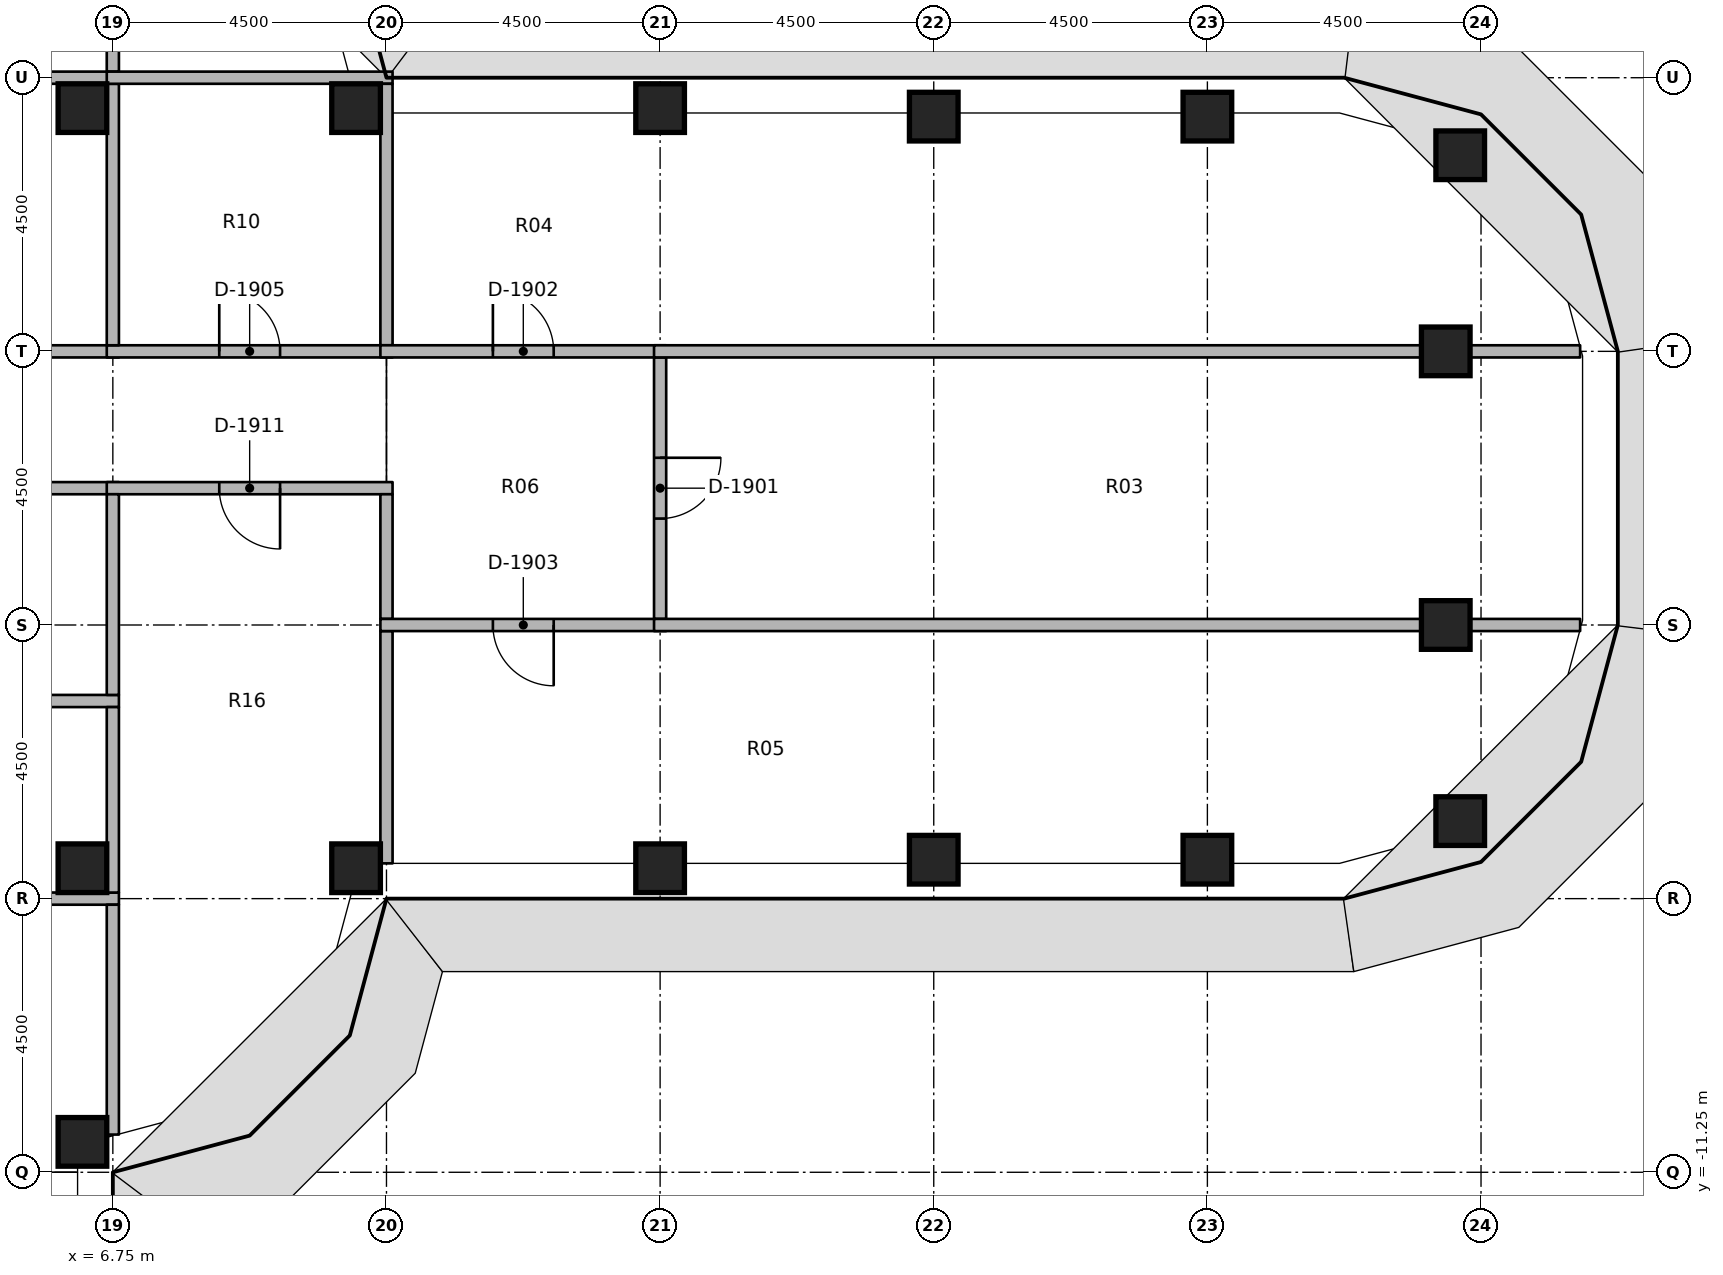
"""IFC4 building model, lengths in metres.
Left out: names, types, materials, properties, quantities, classifications, styles, units other than length and angle.
Written with IfcOpenShell. Run it as: python <this file> out.ifc"""

import sys

from ifc_helpers import new_model, si_unit, direction, frame, frame_2d, origin, origin_2d, place, context, subcontext, project, spatial, rectangle, extrude, element, fill, save


model = new_model("IFC4")
c1 = context("Model", 3, precision=1e-05, world=origin(), true_north=direction((0.0, 1.0)))
c2 = subcontext(c1, "Body", "Model", "MODEL_VIEW")
j1 = project(units=[si_unit("LENGTHUNIT", "METRE"), si_unit("PLANEANGLEUNIT", "RADIAN")], contexts=[c1])
p1 = place(None, origin())
s1 = spatial("IfcSite", under=j1, at=p1, CompositionType="ELEMENT")
p2 = place(p1, origin())
s2 = spatial("IfcBuilding", under=s1, at=p2, CompositionType="ELEMENT")
p3 = place(p2, frame((0.0, 0.0, 179.0)))
s3 = spatial("IfcBuildingStorey", under=s2, at=p3, CompositionType="ELEMENT", Elevation=179.0)
for number, where, z_axis, x_axis in (
    (1, (6.25, -10.75, 0.0), (0.0, 0.0, 1.0), (1.0, 0.0, 0.0)),
    (2, (6.25, -6.25, 0.0), (0.0, 0.0, 1.0), (1.0, 0.0, 0.0)),
    (3, (6.25, 6.25, 0.0), (0.0, 0.0, 1.0), (1.0, 0.0, 0.0)),
    (4, (10.75, -6.25, 0.0), (0.0, 0.0, 1.0), (1.0, 0.0, 0.0)),
    (5, (10.75, 6.25, 0.0), (0.0, 0.0, 1.0), (1.0, 0.0, 0.0)),
    (6, (15.75, -6.25, 0.0), (0.0, 0.0, 1.0), (1.0, 0.0, 0.0)),
    (7, (15.75, 6.25, 0.0), (0.0, 0.0, 1.0), (1.0, 0.0, 0.0)),
    (8, (20.25, -6.11, 0.0), (0.0, 0.0, 1.0), (1.0, 0.0, 0.0)),
    (9, (20.25, 6.11, 0.0), (0.0, 0.0, 1.0), (1.0, 0.0, 0.0)),
    (10, (24.75, -6.11, 0.0), (0.0, 0.0, 1.0), (1.0, 0.0, 0.0)),
    (11, (24.75, 6.11, 0.0), (0.0, 0.0, 1.0), (1.0, 0.0, 0.0)),
    (12, (28.908, -5.475, 0.0), (0.0, 0.0, 1.0), (1.0, 0.0, 0.0)),
    (13, (28.67, -2.25, 0.0), (0.0, 0.0, 1.0), (1.0, 0.0, 0.0)),
    (14, (28.67, 2.25, 0.0), (0.0, 0.0, 1.0), (1.0, 0.0, 0.0)),
    (15, (28.908, 5.475, 0.0), (0.0, 0.0, 1.0), (1.0, 0.0, 0.0)),
):
    element("IfcColumn", number, at=place(p3, frame(where, z_axis=z_axis, x_axis=x_axis)), inside=s3, PredefinedType="COLUMN", context=c2, shape_type="SweptSolid", body=[
        extrude(rectangle(XDim=0.8, YDim=0.8, at=origin_2d()), origin(), (0.0, 0.0, 1.0), 3.65),
    ])
p4 = place(p3, frame((1.025, 2.25, 0.0), z_axis=(0.0, 0.0, 1.0), x_axis=(1.0, 0.0, 0.0)))
e16 = element("IfcWall", 16, at=p4, inside=s3, PredefinedType="PARTITIONING", context=c2, shape_type="SweptSolid", body=[
    extrude(rectangle(XDim=5.825, YDim=0.2, at=frame_2d((2.913, 0.0))), origin(), (0.0, 0.0, 1.0), 2.75),
])
p5 = place(p4, frame((2.413, 0.0, 0.0)))
e17 = element("IfcOpeningElement", 17, at=p5, cuts=e16, PredefinedType="OPENING", context=c2, shape_type="SweptSolid", body=[
    extrude(rectangle(XDim=1.0, YDim=2.1, at=frame_2d((0.5, 1.05))), frame((0.0, 0.11, 0.0), z_axis=(0.0, -1.0, 0.0), x_axis=(1.0, 0.0, 0.0)), (0.0, 0.0, 1.0), 0.22),
])
p6 = place(p3, frame((6.65, 2.25, 0.0), z_axis=(0.0, 0.0, 1.0), x_axis=(1.0, 0.0, 0.0)))
e18 = element("IfcWall", 18, at=p6, inside=s3, PredefinedType="PARTITIONING", context=c2, shape_type="SweptSolid", body=[
    extrude(rectangle(XDim=4.7, YDim=0.2, at=frame_2d((2.35, 0.0))), origin(), (0.0, 0.0, 1.0), 2.75),
])
p7 = place(p6, frame((1.85, 0.0, 0.0)))
e19 = element("IfcOpeningElement", 19, at=p7, cuts=e18, PredefinedType="OPENING", context=c2, shape_type="SweptSolid", body=[
    extrude(rectangle(XDim=1.0, YDim=2.1, at=frame_2d((0.5, 1.05))), frame((0.0, 0.11, 0.0), z_axis=(0.0, -1.0, 0.0), x_axis=(1.0, 0.0, 0.0)), (0.0, 0.0, 1.0), 0.22),
])
p8 = place(p3, frame((6.85, 0.0, 0.0), z_axis=(0.0, 0.0, 1.0), x_axis=(-1.0, 0.0, 0.0)))
e20 = element("IfcWall", 20, at=p8, inside=s3, PredefinedType="PARTITIONING", context=c2, shape_type="SweptSolid", body=[
    extrude(rectangle(XDim=5.825, YDim=0.2, at=frame_2d((2.913, 0.0))), origin(), (0.0, 0.0, 1.0), 2.75),
])
p9 = place(p8, frame((2.462, 0.0, 0.0)))
e21 = element("IfcOpeningElement", 21, at=p9, cuts=e20, PredefinedType="OPENING", context=c2, shape_type="SweptSolid", body=[
    extrude(rectangle(XDim=0.9, YDim=2.1, at=frame_2d((0.45, 1.05))), frame((0.0, 0.11, 0.0), z_axis=(0.0, -1.0, 0.0), x_axis=(1.0, 0.0, 0.0)), (0.0, 0.0, 1.0), 0.22),
])
p10 = place(p3, frame((11.35, 0.0, 0.0), z_axis=(0.0, 0.0, 1.0), x_axis=(-1.0, 0.0, 0.0)))
e22 = element("IfcWall", 22, at=p10, inside=s3, PredefinedType="PARTITIONING", context=c2, shape_type="SweptSolid", body=[
    extrude(rectangle(XDim=4.7, YDim=0.2, at=frame_2d((2.35, 0.0))), origin(), (0.0, 0.0, 1.0), 2.75),
])
p11 = place(p10, frame((1.85, 0.0, 0.0)))
e23 = element("IfcOpeningElement", 23, at=p11, cuts=e22, PredefinedType="OPENING", context=c2, shape_type="SweptSolid", body=[
    extrude(rectangle(XDim=1.0, YDim=2.1, at=frame_2d((0.5, 1.05))), frame((0.0, 0.11, 0.0), z_axis=(0.0, -1.0, 0.0), x_axis=(1.0, 0.0, 0.0)), (0.0, 0.0, 1.0), 0.22),
])
p12 = place(p3, frame((1.025, 6.75, 0.0), z_axis=(0.0, 0.0, 1.0), x_axis=(1.0, 0.0, 0.0)))
e24 = element("IfcWall", 24, at=p12, inside=s3, PredefinedType="PARTITIONING", context=c2, shape_type="SweptSolid", body=[
    extrude(rectangle(XDim=5.825, YDim=0.2, at=frame_2d((2.913, 0.0))), origin(), (0.0, 0.0, 1.0), 2.75),
])
p13 = place(p3, frame((6.75, 10.63, 0.0), z_axis=(0.0, 0.0, 1.0), x_axis=(0.0, -1.0, 0.0)))
e25 = element("IfcWall", 25, at=p13, inside=s3, PredefinedType="PARTITIONING", context=c2, shape_type="SweptSolid", body=[
    extrude(rectangle(XDim=3.78, YDim=0.2, at=frame_2d((1.89, 0.0))), origin(), (0.0, 0.0, 1.0), 2.75),
])
p14 = place(p13, frame((1.44, 0.0, 0.0)))
e26 = element("IfcOpeningElement", 26, at=p14, cuts=e25, PredefinedType="OPENING", context=c2, shape_type="SweptSolid", body=[
    extrude(rectangle(XDim=0.9, YDim=2.1, at=frame_2d((0.45, 1.05))), frame((0.0, 0.11, 0.0), z_axis=(0.0, -1.0, 0.0), x_axis=(1.0, 0.0, 0.0)), (0.0, 0.0, 1.0), 0.22),
])
p15 = place(p3, frame((1.025, -6.75, 0.0), z_axis=(0.0, 0.0, 1.0), x_axis=(1.0, 0.0, 0.0)))
e27 = element("IfcWall", 27, at=p15, inside=s3, PredefinedType="PARTITIONING", context=c2, shape_type="SweptSolid", body=[
    extrude(rectangle(XDim=5.825, YDim=0.2, at=frame_2d((2.913, 0.0))), origin(), (0.0, 0.0, 1.0), 2.75),
])
p16 = place(p3, frame((6.75, -10.63, 0.0), z_axis=(0.0, 0.0, 1.0), x_axis=(0.0, 1.0, 0.0)))
e28 = element("IfcWall", 28, at=p16, inside=s3, PredefinedType="PARTITIONING", context=c2, shape_type="SweptSolid", body=[
    extrude(rectangle(XDim=3.78, YDim=0.2, at=frame_2d((1.89, 0.0))), origin(), (0.0, 0.0, 1.0), 2.75),
])
p17 = place(p3, frame((6.75, 2.35, 0.0), z_axis=(0.0, 0.0, 1.0), x_axis=(0.0, 1.0, 0.0)))
e29 = element("IfcWall", 29, at=p17, inside=s3, PredefinedType="PARTITIONING", context=c2, shape_type="SweptSolid", body=[
    extrude(rectangle(XDim=4.3, YDim=0.2, at=frame_2d((2.15, 0.0))), origin(), (0.0, 0.0, 1.0), 2.75),
])
p18 = place(p3, frame((6.65, 6.75, 0.0), z_axis=(0.0, 0.0, 1.0), x_axis=(1.0, 0.0, 0.0)))
e30 = element("IfcWall", 30, at=p18, inside=s3, PredefinedType="PARTITIONING", context=c2, shape_type="SweptSolid", body=[
    extrude(rectangle(XDim=4.7, YDim=0.2, at=frame_2d((2.35, 0.0))), origin(), (0.0, 0.0, 1.0), 2.75),
])
p19 = place(p3, frame((11.25, 2.35, 0.0), z_axis=(0.0, 0.0, 1.0), x_axis=(0.0, 1.0, 0.0)))
e31 = element("IfcWall", 31, at=p19, inside=s3, PredefinedType="PARTITIONING", context=c2, shape_type="SweptSolid", body=[
    extrude(rectangle(XDim=4.3, YDim=0.2, at=frame_2d((2.15, 0.0))), origin(), (0.0, 0.0, 1.0), 2.75),
])
p20 = place(p3, frame((1.025, -3.5, 0.0), z_axis=(0.0, 0.0, 1.0), x_axis=(1.0, 0.0, 0.0)))
e32 = element("IfcWall", 32, at=p20, inside=s3, PredefinedType="PARTITIONING", context=c2, shape_type="SweptSolid", body=[
    extrude(rectangle(XDim=5.825, YDim=0.2, at=frame_2d((2.913, 0.0))), origin(), (0.0, 0.0, 1.0), 2.75),
])
p21 = place(p3, frame((6.75, -3.4, 0.0), z_axis=(0.0, 0.0, 1.0), x_axis=(0.0, 1.0, 0.0)))
e33 = element("IfcWall", 33, at=p21, inside=s3, PredefinedType="PARTITIONING", context=c2, shape_type="SweptSolid", body=[
    extrude(rectangle(XDim=3.3, YDim=0.2, at=frame_2d((1.65, 0.0))), origin(), (0.0, 0.0, 1.0), 2.75),
])
p22 = place(p3, frame((6.75, -6.65, 0.0), z_axis=(0.0, 0.0, 1.0), x_axis=(0.0, 1.0, 0.0)))
e34 = element("IfcWall", 34, at=p22, inside=s3, PredefinedType="PARTITIONING", context=c2, shape_type="SweptSolid", body=[
    extrude(rectangle(XDim=3.05, YDim=0.2, at=frame_2d((1.525, 0.0))), origin(), (0.0, 0.0, 1.0), 2.75),
])
p23 = place(p3, frame((11.25, -2.15, 0.0), z_axis=(0.0, 0.0, 1.0), x_axis=(0.0, 1.0, 0.0)))
e35 = element("IfcWall", 35, at=p23, inside=s3, PredefinedType="PARTITIONING", context=c2, shape_type="SweptSolid", body=[
    extrude(rectangle(XDim=2.05, YDim=0.2, at=frame_2d((1.025, 0.0))), origin(), (0.0, 0.0, 1.0), 2.75),
])
p24 = place(p3, frame((11.25, -6.17, 0.0), z_axis=(0.0, 0.0, 1.0), x_axis=(0.0, 1.0, 0.0)))
e36 = element("IfcWall", 36, at=p24, inside=s3, PredefinedType="PARTITIONING", context=c2, shape_type="SweptSolid", body=[
    extrude(rectangle(XDim=3.82, YDim=0.2, at=frame_2d((1.91, 0.0))), origin(), (0.0, 0.0, 1.0), 2.75),
])
p25 = place(p3, frame((11.15, 2.25, 0.0), z_axis=(0.0, 0.0, 1.0), x_axis=(1.0, 0.0, 0.0)))
e37 = element("IfcWall", 37, at=p25, inside=s3, PredefinedType="PARTITIONING", context=c2, shape_type="SweptSolid", body=[
    extrude(rectangle(XDim=4.7, YDim=0.2, at=frame_2d((2.35, 0.0))), origin(), (0.0, 0.0, 1.0), 2.75),
])
p26 = place(p25, frame((1.85, 0.0, 0.0)))
e38 = element("IfcOpeningElement", 38, at=p26, cuts=e37, PredefinedType="OPENING", context=c2, shape_type="SweptSolid", body=[
    extrude(rectangle(XDim=1.0, YDim=2.1, at=frame_2d((0.5, 1.05))), frame((0.0, 0.11, 0.0), z_axis=(0.0, -1.0, 0.0), x_axis=(1.0, 0.0, 0.0)), (0.0, 0.0, 1.0), 0.22),
])
p27 = place(p3, frame((15.85, -2.25, 0.0), z_axis=(0.0, 0.0, 1.0), x_axis=(-1.0, 0.0, 0.0)))
e39 = element("IfcWall", 39, at=p27, inside=s3, PredefinedType="PARTITIONING", context=c2, shape_type="SweptSolid", body=[
    extrude(rectangle(XDim=4.7, YDim=0.2, at=frame_2d((2.35, 0.0))), origin(), (0.0, 0.0, 1.0), 2.75),
])
p28 = place(p27, frame((1.85, 0.0, 0.0)))
e40 = element("IfcOpeningElement", 40, at=p28, cuts=e39, PredefinedType="OPENING", context=c2, shape_type="SweptSolid", body=[
    extrude(rectangle(XDim=1.0, YDim=2.1, at=frame_2d((0.5, 1.05))), frame((0.0, 0.11, 0.0), z_axis=(0.0, -1.0, 0.0), x_axis=(1.0, 0.0, 0.0)), (0.0, 0.0, 1.0), 0.22),
])
p29 = place(p3, frame((15.75, 2.15, 0.0), z_axis=(0.0, 0.0, 1.0), x_axis=(0.0, -1.0, 0.0)))
e41 = element("IfcWall", 41, at=p29, inside=s3, PredefinedType="PARTITIONING", context=c2, shape_type="SweptSolid", body=[
    extrude(rectangle(XDim=4.3, YDim=0.2, at=frame_2d((2.15, 0.0))), origin(), (0.0, 0.0, 1.0), 2.75),
])
p30 = place(p29, frame((1.65, 0.0, 0.0)))
e42 = element("IfcOpeningElement", 42, at=p30, cuts=e41, PredefinedType="OPENING", context=c2, shape_type="SweptSolid", body=[
    extrude(rectangle(XDim=1.0, YDim=2.1, at=frame_2d((0.5, 1.05))), frame((0.0, 0.11, 0.0), z_axis=(0.0, -1.0, 0.0), x_axis=(1.0, 0.0, 0.0)), (0.0, 0.0, 1.0), 0.22),
])
p31 = place(p3, frame((15.65, 2.25, 0.0), z_axis=(0.0, 0.0, 1.0), x_axis=(1.0, 0.0, 0.0)))
e43 = element("IfcWall", 43, at=p31, inside=s3, PredefinedType="PARTITIONING", context=c2, shape_type="SweptSolid", body=[
    extrude(rectangle(XDim=12.62, YDim=0.2, at=frame_2d((6.31, 0.0))), origin(), (0.0, 0.0, 1.0), 2.75),
])
p32 = place(p3, frame((29.07, 2.25, 0.0), z_axis=(0.0, 0.0, 1.0), x_axis=(1.0, 0.0, 0.0)))
e44 = element("IfcWall", 44, at=p32, inside=s3, PredefinedType="PARTITIONING", context=c2, shape_type="SweptSolid", body=[
    extrude(rectangle(XDim=1.81, YDim=0.2, at=frame_2d((0.905, 0.0))), origin(), (0.0, 0.0, 1.0), 2.75),
])
p33 = place(p3, frame((15.65, -2.25, 0.0), z_axis=(0.0, 0.0, 1.0), x_axis=(1.0, 0.0, 0.0)))
e45 = element("IfcWall", 45, at=p33, inside=s3, PredefinedType="PARTITIONING", context=c2, shape_type="SweptSolid", body=[
    extrude(rectangle(XDim=12.62, YDim=0.2, at=frame_2d((6.31, 0.0))), origin(), (0.0, 0.0, 1.0), 2.75),
])
p34 = place(p3, frame((29.07, -2.25, 0.0), z_axis=(0.0, 0.0, 1.0), x_axis=(1.0, 0.0, 0.0)))
e46 = element("IfcWall", 46, at=p34, inside=s3, PredefinedType="PARTITIONING", context=c2, shape_type="SweptSolid", body=[
    extrude(rectangle(XDim=1.81, YDim=0.2, at=frame_2d((0.905, 0.0))), origin(), (0.0, 0.0, 1.0), 2.75),
])
p35 = place(p30, origin())
e47 = element("IfcDoor", 47, at=p35, inside=s3, OperationType="SINGLE_SWING_RIGHT", PredefinedType="DOOR", context=c2, shape_type="SweptSolid", body=[
    extrude(rectangle(XDim=1.0, YDim=2.1, at=frame_2d((0.5, 1.05))), frame((0.0, 0.025, 0.0), z_axis=(0.0, -1.0, 0.0), x_axis=(1.0, 0.0, 0.0)), (0.0, 0.0, 1.0), 0.05),
])
fill(e42, e47)
p36 = place(p26, origin())
e48 = element("IfcDoor", 48, at=p36, inside=s3, OperationType="SINGLE_SWING_RIGHT", PredefinedType="DOOR", context=c2, shape_type="SweptSolid", body=[
    extrude(rectangle(XDim=1.0, YDim=2.1, at=frame_2d((0.5, 1.05))), frame((0.0, 0.025, 0.0), z_axis=(0.0, -1.0, 0.0), x_axis=(1.0, 0.0, 0.0)), (0.0, 0.0, 1.0), 0.05),
])
fill(e38, e48)
p37 = place(p28, origin())
e49 = element("IfcDoor", 49, at=p37, inside=s3, OperationType="SINGLE_SWING_RIGHT", PredefinedType="DOOR", context=c2, shape_type="SweptSolid", body=[
    extrude(rectangle(XDim=1.0, YDim=2.1, at=frame_2d((0.5, 1.05))), frame((0.0, 0.025, 0.0), z_axis=(0.0, -1.0, 0.0), x_axis=(1.0, 0.0, 0.0)), (0.0, 0.0, 1.0), 0.05),
])
fill(e40, e49)
p38 = place(p7, origin())
e50 = element("IfcDoor", 50, at=p38, inside=s3, OperationType="SINGLE_SWING_RIGHT", PredefinedType="DOOR", context=c2, shape_type="SweptSolid", body=[
    extrude(rectangle(XDim=1.0, YDim=2.1, at=frame_2d((0.5, 1.05))), frame((0.0, 0.025, 0.0), z_axis=(0.0, -1.0, 0.0), x_axis=(1.0, 0.0, 0.0)), (0.0, 0.0, 1.0), 0.05),
])
fill(e19, e50)
p39 = place(p11, origin())
e51 = element("IfcDoor", 51, at=p39, inside=s3, OperationType="SINGLE_SWING_RIGHT", PredefinedType="DOOR", context=c2, shape_type="SweptSolid", body=[
    extrude(rectangle(XDim=1.0, YDim=2.1, at=frame_2d((0.5, 1.05))), frame((0.0, 0.025, 0.0), z_axis=(0.0, -1.0, 0.0), x_axis=(1.0, 0.0, 0.0)), (0.0, 0.0, 1.0), 0.05),
])
fill(e23, e51)
save(model, sys.argv[1])
